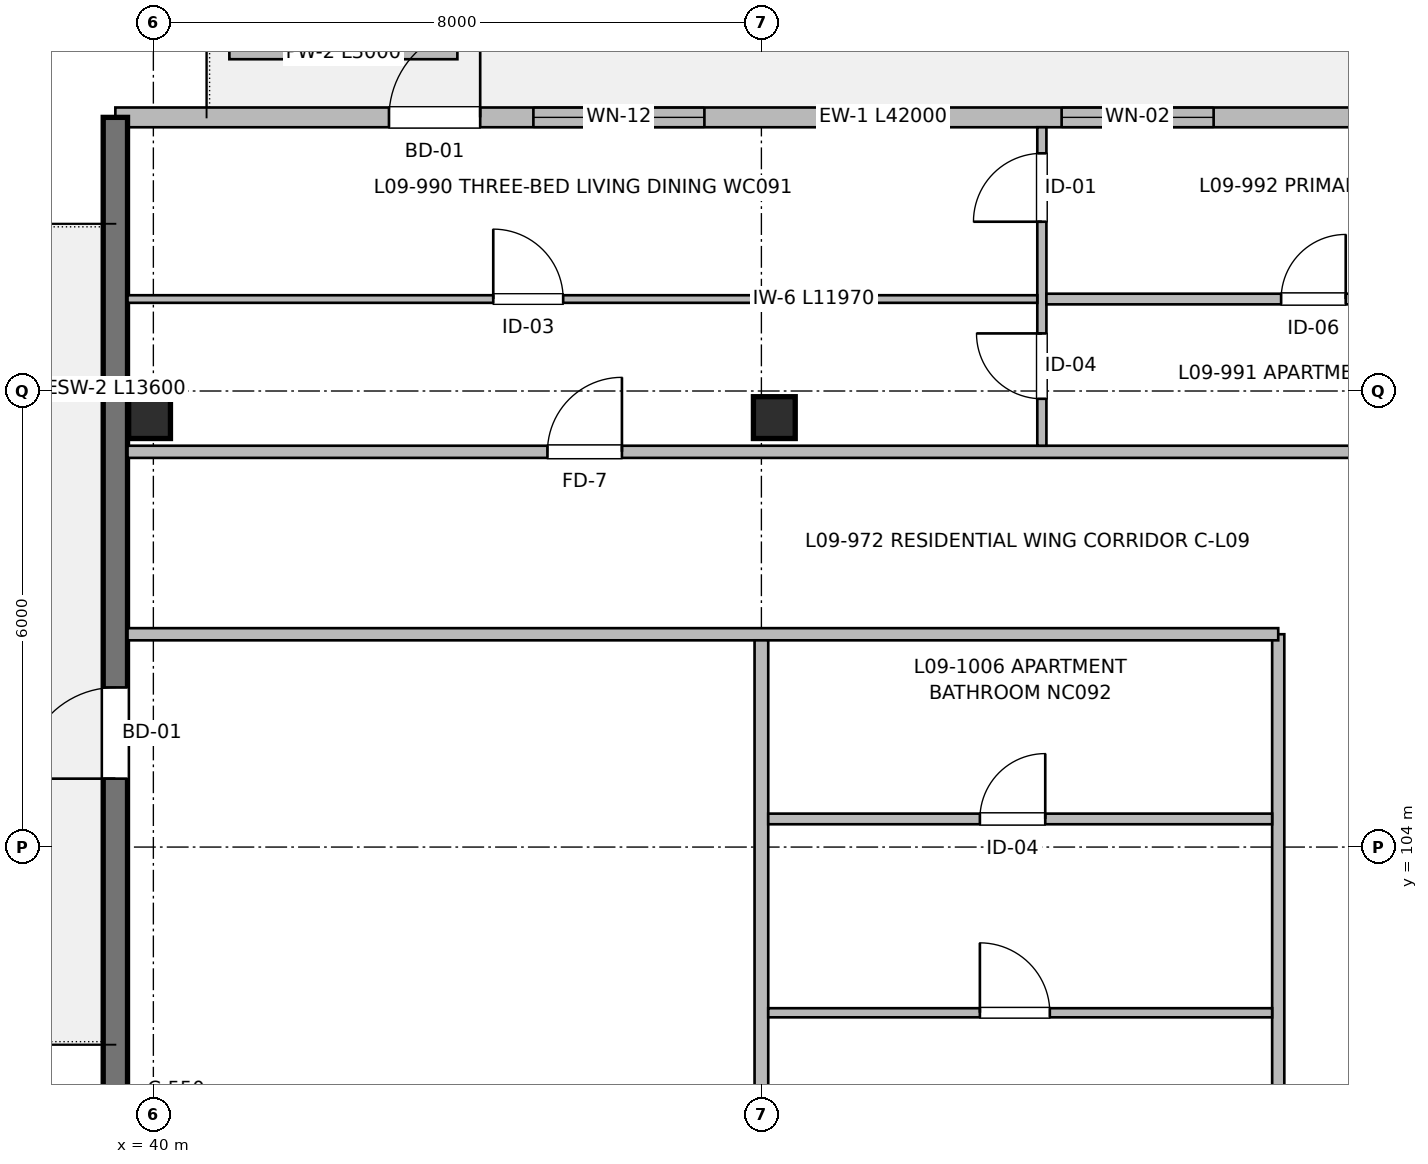
"""IFC4 building model, lengths in metres.
Left out: names, types, materials, properties, quantities, classifications, styles, units other than length and angle.
Written with IfcOpenShell. Run it as: python <this file> out.ifc"""

import sys

from ifc_helpers import new_model, si_unit, direction, frame, frame_2d, origin, origin_2d, place, context, subcontext, project, spatial, rectangle, extrude, element, fill, save


model = new_model("IFC4")
c1 = context("Model", 3, precision=1e-05, world=origin(), true_north=direction((0.0, 1.0)))
c2 = subcontext(c1, "Body", "Model", "MODEL_VIEW")
j1 = project(units=[si_unit("LENGTHUNIT", "METRE"), si_unit("PLANEANGLEUNIT", "RADIAN")], contexts=[c1])
p1 = place(None, origin())
s1 = spatial("IfcSite", under=j1, at=p1, CompositionType="ELEMENT")
p2 = place(p1, origin())
s2 = spatial("IfcBuilding", under=s1, at=p2, CompositionType="ELEMENT")
p3 = place(p2, frame((0.0, 0.0, 29.76)))
s3 = spatial("IfcBuildingStorey", under=s2, at=p3, CompositionType="ELEMENT", Elevation=29.76)
for number, where, z_axis, x_axis in (
    (1, (39.95, 109.65, 0.0), (0.0, 0.0, 1.0), (1.0, 0.0, 0.0)),
    (2, (48.17, 109.65, 0.0), (0.0, 0.0, 1.0), (1.0, 0.0, 0.0)),
):
    element("IfcColumn", number, at=place(p3, frame(where, z_axis=z_axis, x_axis=x_axis)), inside=s3, PredefinedType="COLUMN", context=c2, shape_type="SweptSolid", body=[
        extrude(rectangle(XDim=0.55, YDim=0.55, at=origin_2d()), origin(), (0.0, 0.0, 1.0), 3.2),
    ])
p4 = place(p3, frame((39.5, 113.6, 0.0), z_axis=(0.0, 0.0, 1.0), x_axis=(1.0, 0.0, 0.0)))
e3 = element("IfcWall", 3, at=p4, inside=s3, PredefinedType="SOLIDWALL", context=c2, shape_type="SweptSolid", body=[
    extrude(rectangle(XDim=42.0, YDim=0.26, at=frame_2d((21.0, 0.0))), origin(), (0.0, 0.0, 1.0), 2.98),
])
p5 = place(p4, frame((3.6, 0.0, 0.0)))
e4 = element("IfcOpeningElement", 4, at=p5, cuts=e3, PredefinedType="OPENING", context=c2, shape_type="SweptSolid", body=[
    extrude(rectangle(XDim=1.2, YDim=2.2, at=frame_2d((0.6, 1.1))), frame((0.0, 0.14, 0.0), z_axis=(0.0, -1.0, 0.0), x_axis=(1.0, 0.0, 0.0)), (0.0, 0.0, 1.0), 0.28),
])
p6 = place(p4, frame((5.5, 0.0, 0.72)))
e5 = element("IfcOpeningElement", 5, at=p6, cuts=e3, PredefinedType="OPENING", context=c2, shape_type="SweptSolid", body=[
    extrude(rectangle(XDim=2.25, YDim=1.5, at=frame_2d((1.125, 0.75))), frame((0.0, 0.14, 0.0), z_axis=(0.0, -1.0, 0.0), x_axis=(1.0, 0.0, 0.0)), (0.0, 0.0, 1.0), 0.28),
])
p7 = place(p4, frame((12.45, 0.0, 0.72)))
e6 = element("IfcOpeningElement", 6, at=p7, cuts=e3, PredefinedType="OPENING", context=c2, shape_type="SweptSolid", body=[
    extrude(rectangle(XDim=2.0, YDim=1.5, at=frame_2d((1.0, 0.75))), frame((0.0, 0.14, 0.0), z_axis=(0.0, -1.0, 0.0), x_axis=(1.0, 0.0, 0.0)), (0.0, 0.0, 1.0), 0.28),
])
p8 = place(p4, frame((19.1, 0.0, 0.0)))
e7 = element("IfcOpeningElement", 7, at=p8, cuts=e3, PredefinedType="OPENING", context=c2, shape_type="SweptSolid", body=[
    extrude(rectangle(XDim=1.2, YDim=2.2, at=frame_2d((0.6, 1.1))), frame((0.0, 0.14, 0.0), z_axis=(0.0, -1.0, 0.0), x_axis=(1.0, 0.0, 0.0)), (0.0, 0.0, 1.0), 0.28),
])
p9 = place(p4, frame((22.3, 0.0, 0.9)))
e8 = element("IfcOpeningElement", 8, at=p9, cuts=e3, PredefinedType="OPENING", context=c2, shape_type="SweptSolid", body=[
    extrude(rectangle(XDim=1.2, YDim=1.05, at=frame_2d((0.6, 0.525))), frame((0.0, 0.14, 0.0), z_axis=(0.0, -1.0, 0.0), x_axis=(1.0, 0.0, 0.0)), (0.0, 0.0, 1.0), 0.28),
])
p10 = place(p4, frame((28.6, 0.0, 0.77)))
e9 = element("IfcOpeningElement", 9, at=p10, cuts=e3, PredefinedType="OPENING", context=c2, shape_type="SweptSolid", body=[
    extrude(rectangle(XDim=1.6, YDim=1.45, at=frame_2d((0.8, 0.725))), frame((0.0, 0.14, 0.0), z_axis=(0.0, -1.0, 0.0), x_axis=(1.0, 0.0, 0.0)), (0.0, 0.0, 1.0), 0.28),
])
p11 = place(p4, frame((37.2, 0.0, 0.0)))
e10 = element("IfcOpeningElement", 10, at=p11, cuts=e3, PredefinedType="OPENING", context=c2, shape_type="SweptSolid", body=[
    extrude(rectangle(XDim=1.2, YDim=2.2, at=frame_2d((0.6, 1.1))), frame((0.0, 0.14, 0.0), z_axis=(0.0, -1.0, 0.0), x_axis=(1.0, 0.0, 0.0)), (0.0, 0.0, 1.0), 0.28),
])
p12 = place(p4, frame((39.1, 0.0, 0.62)))
e11 = element("IfcOpeningElement", 11, at=p12, cuts=e3, PredefinedType="OPENING", context=c2, shape_type="SweptSolid", body=[
    extrude(rectangle(XDim=1.1, YDim=1.6, at=frame_2d((0.55, 0.8))), frame((0.0, 0.14, 0.0), z_axis=(0.0, -1.0, 0.0), x_axis=(1.0, 0.0, 0.0)), (0.0, 0.0, 1.0), 0.28),
])
p13 = place(p3, frame((39.5, 100.0, 0.0), z_axis=(0.0, 0.0, 1.0), x_axis=(0.0, 1.0, 0.0)))
e12 = element("IfcWall", 12, at=p13, inside=s3, PredefinedType="SHEAR", context=c2, shape_type="SweptSolid", body=[
    extrude(rectangle(XDim=13.6, YDim=0.32, at=frame_2d((6.8, 0.0))), origin(), (0.0, 0.0, 1.0), 2.98),
])
p14 = place(p13, frame((4.9, 0.0, 0.0)))
e13 = element("IfcOpeningElement", 13, at=p14, cuts=e12, PredefinedType="OPENING", context=c2, shape_type="SweptSolid", body=[
    extrude(rectangle(XDim=1.2, YDim=2.2, at=frame_2d((0.6, 1.1))), frame((0.0, 0.17, 0.0), z_axis=(0.0, -1.0, 0.0), x_axis=(1.0, 0.0, 0.0)), (0.0, 0.0, 1.0), 0.34),
])
p15 = place(p3, frame((41.0, 114.45, 0.0), z_axis=(0.0, 0.0, 1.0), x_axis=(1.0, 0.0, 0.0)))
e14 = element("IfcWall", 14, at=p15, inside=s3, PredefinedType="PARAPET", context=c2, shape_type="SweptSolid", body=[
    extrude(rectangle(XDim=3.0, YDim=0.17, at=frame_2d((1.5, 0.0))), origin(), (0.0, 0.0, 1.0), 0.45),
])
p16 = place(p3, frame((54.8, 64.56, 0.0), z_axis=(0.0, 0.0, 1.0), x_axis=(0.0, 1.0, 0.0)))
e15 = element("IfcWall", 15, at=p16, inside=s3, PredefinedType="PARTITIONING", context=c2, shape_type="SweptSolid", body=[
    extrude(rectangle(XDim=42.24, YDim=0.16, at=frame_2d((21.12, 0.0))), origin(), (0.0, 0.0, 1.0), 2.935),
])
p17 = place(p16, frame((4.44, 0.0, 0.0)))
e16 = element("IfcOpeningElement", 16, at=p17, cuts=e15, PredefinedType="OPENING", context=c2, shape_type="SweptSolid", body=[
    extrude(rectangle(XDim=1.1, YDim=2.15, at=frame_2d((0.55, 1.075))), frame((0.0, 0.09, 0.0), z_axis=(0.0, -1.0, 0.0), x_axis=(1.0, 0.0, 0.0)), (0.0, 0.0, 1.0), 0.18),
])
p18 = place(p16, frame((10.84, 0.0, 0.0)))
e17 = element("IfcOpeningElement", 17, at=p18, cuts=e15, PredefinedType="OPENING", context=c2, shape_type="SweptSolid", body=[
    extrude(rectangle(XDim=1.6, YDim=2.15, at=frame_2d((0.8, 1.075))), frame((0.0, 0.09, 0.0), z_axis=(0.0, -1.0, 0.0), x_axis=(1.0, 0.0, 0.0)), (0.0, 0.0, 1.0), 0.18),
])
p19 = place(p16, frame((24.445, 0.0, 0.0)))
e18 = element("IfcOpeningElement", 18, at=p19, cuts=e15, PredefinedType="OPENING", context=c2, shape_type="SweptSolid", body=[
    extrude(rectangle(XDim=0.98, YDim=2.15, at=frame_2d((0.49, 1.075))), frame((0.0, 0.09, 0.0), z_axis=(0.0, -1.0, 0.0), x_axis=(1.0, 0.0, 0.0)), (0.0, 0.0, 1.0), 0.18),
])
p20 = place(p16, frame((32.255, 0.0, 0.0)))
e19 = element("IfcOpeningElement", 19, at=p20, cuts=e15, PredefinedType="OPENING", context=c2, shape_type="SweptSolid", body=[
    extrude(rectangle(XDim=0.98, YDim=2.15, at=frame_2d((0.49, 1.075))), frame((0.0, 0.09, 0.0), z_axis=(0.0, -1.0, 0.0), x_axis=(1.0, 0.0, 0.0)), (0.0, 0.0, 1.0), 0.18),
])
p21 = place(p3, frame((39.66, 106.8, 0.0), z_axis=(0.0, 0.0, 1.0), x_axis=(1.0, 0.0, 0.0)))
e20 = element("IfcWall", 20, at=p21, inside=s3, PredefinedType="PARTITIONING", context=c2, shape_type="SweptSolid", body=[
    extrude(rectangle(XDim=15.14, YDim=0.16, at=frame_2d((7.57, 0.0))), origin(), (0.0, 0.0, 1.0), 2.935),
])
p22 = place(p3, frame((39.66, 109.2, 0.0), z_axis=(0.0, 0.0, 1.0), x_axis=(1.0, 0.0, 0.0)))
e21 = element("IfcWall", 21, at=p22, inside=s3, PredefinedType="PARTITIONING", context=c2, shape_type="SweptSolid", body=[
    extrude(rectangle(XDim=41.68, YDim=0.16, at=frame_2d((20.84, 0.0))), origin(), (0.0, 0.0, 1.0), 2.935),
])
p23 = place(p22, frame((5.525, 0.0, 0.0)))
e22 = element("IfcOpeningElement", 22, at=p23, cuts=e21, PredefinedType="OPENING", context=c2, shape_type="SweptSolid", body=[
    extrude(rectangle(XDim=0.98, YDim=2.15, at=frame_2d((0.49, 1.075))), frame((0.0, 0.09, 0.0), z_axis=(0.0, -1.0, 0.0), x_axis=(1.0, 0.0, 0.0)), (0.0, 0.0, 1.0), 0.18),
])
p24 = place(p22, frame((26.455, 0.0, 0.0)))
e23 = element("IfcOpeningElement", 23, at=p24, cuts=e21, PredefinedType="OPENING", context=c2, shape_type="SweptSolid", body=[
    extrude(rectangle(XDim=0.98, YDim=2.15, at=frame_2d((0.49, 1.075))), frame((0.0, 0.09, 0.0), z_axis=(0.0, -1.0, 0.0), x_axis=(1.0, 0.0, 0.0)), (0.0, 0.0, 1.0), 0.18),
])
p25 = place(p3, frame((48.0, 100.05, 0.0), z_axis=(0.0, 0.0, 1.0), x_axis=(0.0, 1.0, 0.0)))
e24 = element("IfcWall", 24, at=p25, inside=s3, PredefinedType="PARTITIONING", context=c2, shape_type="SweptSolid", body=[
    extrude(rectangle(XDim=6.67, YDim=0.18, at=frame_2d((3.335, 0.0))), origin(), (0.0, 0.0, 1.0), 2.68),
])
p26 = place(p3, frame((51.69, 109.28, 0.0), z_axis=(0.0, 0.0, 1.0), x_axis=(0.0, 1.0, 0.0)))
e25 = element("IfcWall", 25, at=p26, inside=s3, PredefinedType="PARTITIONING", context=c2, shape_type="SweptSolid", body=[
    extrude(rectangle(XDim=4.19, YDim=0.12, at=frame_2d((2.095, 0.0))), origin(), (0.0, 0.0, 1.0), 2.935),
])
p27 = place(p26, frame((0.618, 0.0, 0.0)))
e26 = element("IfcOpeningElement", 26, at=p27, cuts=e25, PredefinedType="OPENING", context=c2, shape_type="SweptSolid", body=[
    extrude(rectangle(XDim=0.86, YDim=2.1, at=frame_2d((0.43, 1.05))), frame((0.0, 0.07, 0.0), z_axis=(0.0, -1.0, 0.0), x_axis=(1.0, 0.0, 0.0)), (0.0, 0.0, 1.0), 0.14),
])
p28 = place(p26, frame((2.947, 0.0, 0.0)))
e27 = element("IfcOpeningElement", 27, at=p28, cuts=e25, PredefinedType="OPENING", context=c2, shape_type="SweptSolid", body=[
    extrude(rectangle(XDim=0.9, YDim=2.1, at=frame_2d((0.45, 1.05))), frame((0.0, 0.07, 0.0), z_axis=(0.0, -1.0, 0.0), x_axis=(1.0, 0.0, 0.0)), (0.0, 0.0, 1.0), 0.14),
])
p29 = place(p3, frame((51.75, 111.21, 0.0), z_axis=(0.0, 0.0, 1.0), x_axis=(1.0, 0.0, 0.0)))
e28 = element("IfcWall", 28, at=p29, inside=s3, PredefinedType="PARTITIONING", context=c2, shape_type="SweptSolid", body=[
    extrude(rectangle(XDim=8.66, YDim=0.14, at=frame_2d((4.33, 0.0))), origin(), (0.0, 0.0, 1.0), 2.935),
])
p30 = place(p29, frame((3.088, 0.0, 0.0)))
e29 = element("IfcOpeningElement", 29, at=p30, cuts=e28, PredefinedType="OPENING", context=c2, shape_type="SweptSolid", body=[
    extrude(rectangle(XDim=0.85, YDim=2.05, at=frame_2d((0.425, 1.025))), frame((0.0, 0.08, 0.0), z_axis=(0.0, -1.0, 0.0), x_axis=(1.0, 0.0, 0.0)), (0.0, 0.0, 1.0), 0.16),
])
p31 = place(p3, frame((39.66, 111.21, 0.0), z_axis=(0.0, 0.0, 1.0), x_axis=(1.0, 0.0, 0.0)))
e30 = element("IfcWall", 30, at=p31, inside=s3, PredefinedType="PARTITIONING", context=c2, shape_type="SweptSolid", body=[
    extrude(rectangle(XDim=11.97, YDim=0.1, at=frame_2d((5.985, 0.0))), origin(), (0.0, 0.0, 1.0), 2.935),
])
p32 = place(p31, frame((4.812, 0.0, 0.0)))
e31 = element("IfcOpeningElement", 31, at=p32, cuts=e30, PredefinedType="OPENING", context=c2, shape_type="SweptSolid", body=[
    extrude(rectangle(XDim=0.92, YDim=2.1, at=frame_2d((0.46, 1.05))), frame((0.0, 0.06, 0.0), z_axis=(0.0, -1.0, 0.0), x_axis=(1.0, 0.0, 0.0)), (0.0, 0.0, 1.0), 0.12),
])
p33 = place(p3, frame((48.09, 101.82, 0.0), z_axis=(0.0, 0.0, 1.0), x_axis=(1.0, 0.0, 0.0)))
e32 = element("IfcWall", 32, at=p33, inside=s3, PredefinedType="PARTITIONING", context=c2, shape_type="SweptSolid", body=[
    extrude(rectangle(XDim=6.63, YDim=0.12, at=frame_2d((3.315, 0.0))), origin(), (0.0, 0.0, 1.0), 2.935),
])
p34 = place(p33, frame((2.785, 0.0, 0.0)))
e33 = element("IfcOpeningElement", 33, at=p34, cuts=e32, PredefinedType="OPENING", context=c2, shape_type="SweptSolid", body=[
    extrude(rectangle(XDim=0.92, YDim=2.1, at=frame_2d((0.46, 1.05))), frame((0.0, 0.07, 0.0), z_axis=(0.0, -1.0, 0.0), x_axis=(1.0, 0.0, 0.0)), (0.0, 0.0, 1.0), 0.14),
])
p35 = place(p3, frame((48.09, 104.37, 0.0), z_axis=(0.0, 0.0, 1.0), x_axis=(1.0, 0.0, 0.0)))
e34 = element("IfcWall", 34, at=p35, inside=s3, PredefinedType="PARTITIONING", context=c2, shape_type="SweptSolid", body=[
    extrude(rectangle(XDim=6.63, YDim=0.14, at=frame_2d((3.315, 0.0))), origin(), (0.0, 0.0, 1.0), 2.935),
])
p36 = place(p35, frame((2.785, 0.0, 0.0)))
e35 = element("IfcOpeningElement", 35, at=p36, cuts=e34, PredefinedType="OPENING", context=c2, shape_type="SweptSolid", body=[
    extrude(rectangle(XDim=0.86, YDim=2.1, at=frame_2d((0.43, 1.05))), frame((0.0, 0.08, 0.0), z_axis=(0.0, -1.0, 0.0), x_axis=(1.0, 0.0, 0.0)), (0.0, 0.0, 1.0), 0.16),
])
p37 = place(p5, origin())
e36 = element("IfcDoor", 36, at=p37, inside=s3, OperationType="SINGLE_SWING_RIGHT", PredefinedType="DOOR", context=c2, shape_type="SweptSolid", body=[
    extrude(rectangle(XDim=1.2, YDim=2.2, at=frame_2d((0.6, 1.1))), frame((0.0, 0.025, 0.0), z_axis=(0.0, -1.0, 0.0), x_axis=(1.0, 0.0, 0.0)), (0.0, 0.0, 1.0), 0.05),
])
fill(e4, e36)
p38 = place(p6, origin())
e37 = element("IfcWindow", 37, at=p38, inside=s3, PartitioningType="SINGLE_PANEL", PredefinedType="WINDOW", context=c2, shape_type="SweptSolid", body=[
    extrude(rectangle(XDim=2.25, YDim=1.5, at=frame_2d((1.125, 0.75))), frame((0.0, 0.03, 0.0), z_axis=(0.0, -1.0, 0.0), x_axis=(1.0, 0.0, 0.0)), (0.0, 0.0, 1.0), 0.06),
])
fill(e5, e37)
p39 = place(p7, origin())
e38 = element("IfcWindow", 38, at=p39, inside=s3, PartitioningType="SINGLE_PANEL", PredefinedType="WINDOW", context=c2, shape_type="SweptSolid", body=[
    extrude(rectangle(XDim=2.0, YDim=1.5, at=frame_2d((1.0, 0.75))), frame((0.0, 0.03, 0.0), z_axis=(0.0, -1.0, 0.0), x_axis=(1.0, 0.0, 0.0)), (0.0, 0.0, 1.0), 0.06),
])
fill(e6, e38)
p40 = place(p14, origin())
e39 = element("IfcDoor", 39, at=p40, inside=s3, OperationType="SINGLE_SWING_LEFT", PredefinedType="DOOR", context=c2, shape_type="SweptSolid", body=[
    extrude(rectangle(XDim=1.2, YDim=2.2, at=frame_2d((0.6, 1.1))), frame((0.0, 0.025, 0.0), z_axis=(0.0, -1.0, 0.0), x_axis=(1.0, 0.0, 0.0)), (0.0, 0.0, 1.0), 0.05),
])
fill(e13, e39)
p41 = place(p23, origin())
e40 = element("IfcDoor", 40, at=p41, inside=s3, OperationType="SINGLE_SWING_RIGHT", PredefinedType="DOOR", context=c2, shape_type="SweptSolid", body=[
    extrude(rectangle(XDim=0.98, YDim=2.15, at=frame_2d((0.49, 1.075))), frame((0.0, 0.025, 0.0), z_axis=(0.0, -1.0, 0.0), x_axis=(1.0, 0.0, 0.0)), (0.0, 0.0, 1.0), 0.05),
])
fill(e22, e40)
p42 = place(p32, origin())
e41 = element("IfcDoor", 41, at=p42, inside=s3, OperationType="SINGLE_SWING_LEFT", PredefinedType="DOOR", context=c2, shape_type="SweptSolid", body=[
    extrude(rectangle(XDim=0.92, YDim=2.1, at=frame_2d((0.46, 1.05))), frame((0.0, 0.025, 0.0), z_axis=(0.0, -1.0, 0.0), x_axis=(1.0, 0.0, 0.0)), (0.0, 0.0, 1.0), 0.05),
])
fill(e31, e41)
p43 = place(p27, origin())
e42 = element("IfcDoor", 42, at=p43, inside=s3, OperationType="SINGLE_SWING_RIGHT", PredefinedType="DOOR", context=c2, shape_type="SweptSolid", body=[
    extrude(rectangle(XDim=0.86, YDim=2.1, at=frame_2d((0.43, 1.05))), frame((0.0, 0.025, 0.0), z_axis=(0.0, -1.0, 0.0), x_axis=(1.0, 0.0, 0.0)), (0.0, 0.0, 1.0), 0.05),
])
fill(e26, e42)
p44 = place(p28, origin())
e43 = element("IfcDoor", 43, at=p44, inside=s3, OperationType="SINGLE_SWING_LEFT", PredefinedType="DOOR", context=c2, shape_type="SweptSolid", body=[
    extrude(rectangle(XDim=0.9, YDim=2.1, at=frame_2d((0.45, 1.05))), frame((0.0, 0.025, 0.0), z_axis=(0.0, -1.0, 0.0), x_axis=(1.0, 0.0, 0.0)), (0.0, 0.0, 1.0), 0.05),
])
fill(e27, e43)
p45 = place(p30, origin())
e44 = element("IfcDoor", 44, at=p45, inside=s3, OperationType="SINGLE_SWING_RIGHT", PredefinedType="DOOR", context=c2, shape_type="SweptSolid", body=[
    extrude(rectangle(XDim=0.85, YDim=2.05, at=frame_2d((0.425, 1.025))), frame((0.0, 0.025, 0.0), z_axis=(0.0, -1.0, 0.0), x_axis=(1.0, 0.0, 0.0)), (0.0, 0.0, 1.0), 0.05),
])
fill(e29, e44)
p46 = place(p36, origin())
e45 = element("IfcDoor", 45, at=p46, inside=s3, OperationType="SINGLE_SWING_RIGHT", PredefinedType="DOOR", context=c2, shape_type="SweptSolid", body=[
    extrude(rectangle(XDim=0.86, YDim=2.1, at=frame_2d((0.43, 1.05))), frame((0.0, 0.025, 0.0), z_axis=(0.0, -1.0, 0.0), x_axis=(1.0, 0.0, 0.0)), (0.0, 0.0, 1.0), 0.05),
])
fill(e35, e45)
p47 = place(p34, origin())
e46 = element("IfcDoor", 46, at=p47, inside=s3, OperationType="SINGLE_SWING_LEFT", PredefinedType="DOOR", context=c2, shape_type="SweptSolid", body=[
    extrude(rectangle(XDim=0.92, YDim=2.1, at=frame_2d((0.46, 1.05))), frame((0.0, 0.025, 0.0), z_axis=(0.0, -1.0, 0.0), x_axis=(1.0, 0.0, 0.0)), (0.0, 0.0, 1.0), 0.05),
])
fill(e33, e46)
save(model, sys.argv[1])
